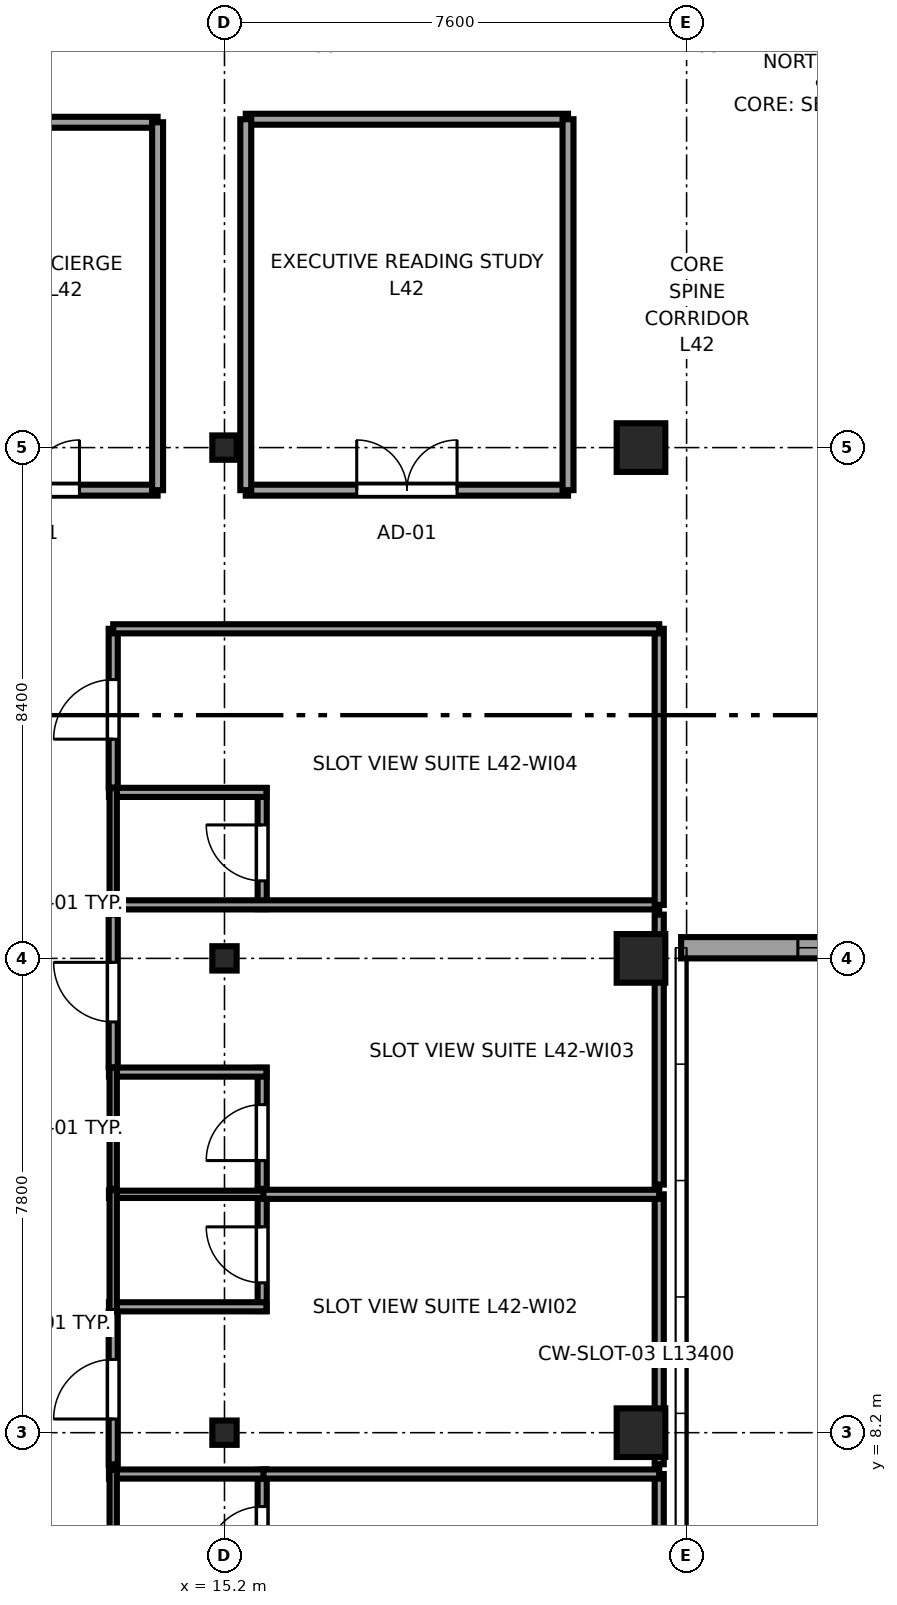
"""IFC4 building model, lengths in metres.
Left out: names, types, materials, properties, quantities, classifications, styles, units other than length and angle.
Written with IfcOpenShell. Run it as: python <this file> out.ifc"""

import sys

from ifc_helpers import new_model, si_unit, direction, frame, frame_2d, origin, origin_2d, place, context, subcontext, project, spatial, rectangle, i_section, extrude, source, transform, mapped, element, fill, save


model = new_model("IFC4")
c1 = context("Model", 3, precision=1e-05, world=origin(), true_north=direction((0.0, 1.0)))
c2 = subcontext(c1, "Body", "Model", "MODEL_VIEW")
j1 = project(units=[si_unit("LENGTHUNIT", "METRE"), si_unit("PLANEANGLEUNIT", "RADIAN")], contexts=[c1])
p1 = place(None, origin())
s1 = spatial("IfcSite", under=j1, at=p1, CompositionType="ELEMENT")
p2 = place(p1, origin())
s2 = spatial("IfcBuilding", under=s1, at=p2, CompositionType="ELEMENT")
p3 = place(p2, frame((0.0, 0.0, 161.25)))
s3 = spatial("IfcBuildingStorey", under=s2, at=p3, CompositionType="ELEMENT", Elevation=161.25)
m1 = source(origin(), c2, "Body", "SweptSolid", [
    extrude(i_section(OverallWidth=0.4, OverallDepth=0.4, WebThickness=0.02, FlangeThickness=0.035, at=origin_2d()), origin(), (0.0, 0.0, 1.0), 3.55),
])
for number, where, z_axis, x_axis in (
    (1, (15.2, 8.2, 0.0), (0.0, 0.0, 1.0), (1.0, 0.0, 0.0)),
    (2, (15.2, 16.0, 0.0), (0.0, 0.0, 1.0), (1.0, 0.0, 0.0)),
    (3, (15.2, 24.4, 0.0), (0.0, 0.0, 1.0), (1.0, 0.0, 0.0)),
):
    element("IfcColumn", number, at=place(p3, frame(where, z_axis=z_axis, x_axis=x_axis)), inside=s3, PredefinedType="COLUMN", context=c2, shape_type="MappedRepresentation", body=[
        mapped(m1, transform((0.0, 0.0, 0.0), x_axis=(1.0, 0.0, 0.0), y_axis=(0.0, 1.0, 0.0), z_axis=(0.0, 0.0, 1.0), scale=1.0)),
    ])
m2 = source(origin(), c2, "Body", "SweptSolid", [
    extrude(rectangle(XDim=0.8, YDim=0.8, at=origin_2d()), origin(), (0.0, 0.0, 1.0), 3.55),
])
for number, where, z_axis, x_axis in (
    (4, (22.05, 8.2, 0.0), (0.0, 0.0, 1.0), (1.0, 0.0, 0.0)),
    (5, (22.05, 16.0, 0.0), (0.0, 0.0, 1.0), (1.0, 0.0, 0.0)),
    (6, (22.05, 24.4, 0.0), (0.0, 0.0, 1.0), (1.0, 0.0, 0.0)),
):
    element("IfcColumn", number, at=place(p3, frame(where, z_axis=z_axis, x_axis=x_axis)), inside=s3, PredefinedType="COLUMN", context=c2, shape_type="MappedRepresentation", body=[
        mapped(m2, transform((0.0, 0.0, 0.0), x_axis=(1.0, 0.0, 0.0), y_axis=(0.0, 1.0, 0.0), z_axis=(0.0, 0.0, 1.0), scale=1.0)),
    ])
p4 = place(p3, frame((22.71, 16.175, 0.0), z_axis=(0.0, 0.0, 1.0), x_axis=(1.0, 0.0, 0.0)))
e7 = element("IfcWall", 7, at=p4, inside=s3, PredefinedType="SOLIDWALL", context=c2, shape_type="SweptSolid", body=[
    extrude(rectangle(XDim=11.58, YDim=0.35, at=frame_2d((5.79, 0.0))), origin(), (0.0, 0.0, 1.0), 2.758),
])
p5 = place(p4, frame((1.92, 0.0, 0.68)))
e8 = element("IfcOpeningElement", 8, at=p5, cuts=e7, PredefinedType="OPENING", context=c2, shape_type="SweptSolid", body=[
    extrude(rectangle(XDim=2.55, YDim=1.92, at=frame_2d((1.275, 0.96))), frame((0.0, 0.185, 0.0), z_axis=(0.0, -1.0, 0.0), x_axis=(1.0, 0.0, 0.0)), (0.0, 0.0, 1.0), 0.37),
])
p6 = place(p4, frame((7.11, 0.0, 0.68)))
e9 = element("IfcOpeningElement", 9, at=p6, cuts=e7, PredefinedType="OPENING", context=c2, shape_type="SweptSolid", body=[
    extrude(rectangle(XDim=2.55, YDim=1.92, at=frame_2d((1.275, 0.96))), frame((0.0, 0.185, 0.0), z_axis=(0.0, -1.0, 0.0), x_axis=(1.0, 0.0, 0.0)), (0.0, 0.0, 1.0), 0.37),
])
p7 = place(p3, frame((15.82, 5.6, 0.0), z_axis=(0.0, 0.0, 1.0), x_axis=(0.0, 1.0, 0.0)))
e10 = element("IfcWall", 10, at=p7, inside=s3, PredefinedType="PARTITIONING", context=c2, shape_type="SweptSolid", body=[
    extrude(rectangle(XDim=1.99, YDim=0.15, at=frame_2d((0.995, 0.0))), origin(), (0.0, 0.0, 1.0), 3.37),
])
p8 = place(p7, frame((0.465, 0.0, 0.0)))
e11 = element("IfcOpeningElement", 11, at=p8, cuts=e10, PredefinedType="OPENING", context=c2, shape_type="SweptSolid", body=[
    extrude(rectangle(XDim=0.92, YDim=2.01, at=frame_2d((0.46, 1.005))), frame((0.0, 0.085, 0.0), z_axis=(0.0, -1.0, 0.0), x_axis=(1.0, 0.0, 0.0)), (0.0, 0.0, 1.0), 0.17),
])
p9 = place(p3, frame((13.3, 7.52, 0.0), z_axis=(0.0, 0.0, 1.0), x_axis=(1.0, 0.0, 0.0)))
e12 = element("IfcWall", 12, at=p9, inside=s3, PredefinedType="PARTITIONING", context=c2, shape_type="SweptSolid", body=[
    extrude(rectangle(XDim=2.59, YDim=0.15, at=frame_2d((1.295, 0.0))), origin(), (0.0, 0.0, 1.0), 3.37),
])
p10 = place(p3, frame((13.37, 5.6, 0.0), z_axis=(0.0, 0.0, 1.0), x_axis=(0.0, 1.0, 0.0)))
e13 = element("IfcWall", 13, at=p10, inside=s3, PredefinedType="PLUMBINGWALL", context=c2, shape_type="SweptSolid", body=[
    extrude(rectangle(XDim=1.99, YDim=0.12, at=frame_2d((0.995, 0.0))), origin(), (0.0, 0.0, 1.0), 3.37),
])
p11 = place(p3, frame((15.82, 10.2, 0.0), z_axis=(0.0, 0.0, 1.0), x_axis=(0.0, 1.0, 0.0)))
e14 = element("IfcWall", 14, at=p11, inside=s3, PredefinedType="PARTITIONING", context=c2, shape_type="SweptSolid", body=[
    extrude(rectangle(XDim=1.99, YDim=0.15, at=frame_2d((0.995, 0.0))), origin(), (0.0, 0.0, 1.0), 3.37),
])
p12 = place(p11, frame((0.465, 0.0, 0.0)))
e15 = element("IfcOpeningElement", 15, at=p12, cuts=e14, PredefinedType="OPENING", context=c2, shape_type="SweptSolid", body=[
    extrude(rectangle(XDim=0.92, YDim=2.01, at=frame_2d((0.46, 1.005))), frame((0.0, 0.085, 0.0), z_axis=(0.0, -1.0, 0.0), x_axis=(1.0, 0.0, 0.0)), (0.0, 0.0, 1.0), 0.17),
])
p13 = place(p3, frame((13.3, 10.27, 0.0), z_axis=(0.0, 0.0, 1.0), x_axis=(1.0, 0.0, 0.0)))
e16 = element("IfcWall", 16, at=p13, inside=s3, PredefinedType="PARTITIONING", context=c2, shape_type="SweptSolid", body=[
    extrude(rectangle(XDim=2.59, YDim=0.15, at=frame_2d((1.295, 0.0))), origin(), (0.0, 0.0, 1.0), 3.37),
])
p14 = place(p3, frame((13.3, 12.12, 0.0), z_axis=(0.0, 0.0, 1.0), x_axis=(1.0, 0.0, 0.0)))
e17 = element("IfcWall", 17, at=p14, inside=s3, PredefinedType="PLUMBINGWALL", context=c2, shape_type="SweptSolid", body=[
    extrude(rectangle(XDim=2.59, YDim=0.12, at=frame_2d((1.295, 0.0))), origin(), (0.0, 0.0, 1.0), 3.37),
])
p15 = place(p3, frame((13.37, 10.2, 0.0), z_axis=(0.0, 0.0, 1.0), x_axis=(0.0, 1.0, 0.0)))
e18 = element("IfcWall", 18, at=p15, inside=s3, PredefinedType="PLUMBINGWALL", context=c2, shape_type="SweptSolid", body=[
    extrude(rectangle(XDim=1.99, YDim=0.12, at=frame_2d((0.995, 0.0))), origin(), (0.0, 0.0, 1.0), 3.37),
])
p16 = place(p3, frame((15.82, 12.21, 0.0), z_axis=(0.0, 0.0, 1.0), x_axis=(0.0, 1.0, 0.0)))
e19 = element("IfcWall", 19, at=p16, inside=s3, PredefinedType="PARTITIONING", context=c2, shape_type="SweptSolid", body=[
    extrude(rectangle(XDim=1.99, YDim=0.15, at=frame_2d((0.995, 0.0))), origin(), (0.0, 0.0, 1.0), 3.37),
])
p17 = place(p16, frame((0.465, 0.0, 0.0)))
e20 = element("IfcOpeningElement", 20, at=p17, cuts=e19, PredefinedType="OPENING", context=c2, shape_type="SweptSolid", body=[
    extrude(rectangle(XDim=0.92, YDim=2.01, at=frame_2d((0.46, 1.005))), frame((0.0, 0.085, 0.0), z_axis=(0.0, -1.0, 0.0), x_axis=(1.0, 0.0, 0.0)), (0.0, 0.0, 1.0), 0.17),
])
p18 = place(p3, frame((13.3, 14.13, 0.0), z_axis=(0.0, 0.0, 1.0), x_axis=(1.0, 0.0, 0.0)))
e21 = element("IfcWall", 21, at=p18, inside=s3, PredefinedType="PARTITIONING", context=c2, shape_type="SweptSolid", body=[
    extrude(rectangle(XDim=2.59, YDim=0.15, at=frame_2d((1.295, 0.0))), origin(), (0.0, 0.0, 1.0), 3.37),
])
p19 = place(p3, frame((13.37, 12.21, 0.0), z_axis=(0.0, 0.0, 1.0), x_axis=(0.0, 1.0, 0.0)))
e22 = element("IfcWall", 22, at=p19, inside=s3, PredefinedType="PLUMBINGWALL", context=c2, shape_type="SweptSolid", body=[
    extrude(rectangle(XDim=1.99, YDim=0.12, at=frame_2d((0.995, 0.0))), origin(), (0.0, 0.0, 1.0), 3.37),
])
p20 = place(p3, frame((15.82, 16.81, 0.0), z_axis=(0.0, 0.0, 1.0), x_axis=(0.0, 1.0, 0.0)))
e23 = element("IfcWall", 23, at=p20, inside=s3, PredefinedType="PARTITIONING", context=c2, shape_type="SweptSolid", body=[
    extrude(rectangle(XDim=1.99, YDim=0.15, at=frame_2d((0.995, 0.0))), origin(), (0.0, 0.0, 1.0), 3.37),
])
p21 = place(p20, frame((0.465, 0.0, 0.0)))
e24 = element("IfcOpeningElement", 24, at=p21, cuts=e23, PredefinedType="OPENING", context=c2, shape_type="SweptSolid", body=[
    extrude(rectangle(XDim=0.92, YDim=2.01, at=frame_2d((0.46, 1.005))), frame((0.0, 0.085, 0.0), z_axis=(0.0, -1.0, 0.0), x_axis=(1.0, 0.0, 0.0)), (0.0, 0.0, 1.0), 0.17),
])
p22 = place(p3, frame((13.3, 16.88, 0.0), z_axis=(0.0, 0.0, 1.0), x_axis=(1.0, 0.0, 0.0)))
e25 = element("IfcWall", 25, at=p22, inside=s3, PredefinedType="PARTITIONING", context=c2, shape_type="SweptSolid", body=[
    extrude(rectangle(XDim=9.05, YDim=0.15, at=frame_2d((4.525, 0.0))), origin(), (0.0, 0.0, 1.0), 3.37),
])
p23 = place(p3, frame((13.3, 18.73, 0.0), z_axis=(0.0, 0.0, 1.0), x_axis=(1.0, 0.0, 0.0)))
e26 = element("IfcWall", 26, at=p23, inside=s3, PredefinedType="PARTITIONING", context=c2, shape_type="SweptSolid", body=[
    extrude(rectangle(XDim=2.59, YDim=0.15, at=frame_2d((1.295, 0.0))), origin(), (0.0, 0.0, 1.0), 3.37),
])
p24 = place(p3, frame((13.37, 16.81, 0.0), z_axis=(0.0, 0.0, 1.0), x_axis=(0.0, 1.0, 0.0)))
e27 = element("IfcWall", 27, at=p24, inside=s3, PredefinedType="PLUMBINGWALL", context=c2, shape_type="SweptSolid", body=[
    extrude(rectangle(XDim=1.99, YDim=0.12, at=frame_2d((0.995, 0.0))), origin(), (0.0, 0.0, 1.0), 3.37),
])
p25 = place(p3, frame((22.35, 3.005, 0.0), z_axis=(0.0, 0.0, 1.0), x_axis=(0.0, 1.0, 0.0)))
e28 = element("IfcWall", 28, at=p25, inside=s3, PredefinedType="PARTITIONING", context=c2, shape_type="SweptSolid", body=[
    extrude(rectangle(XDim=4.515, YDim=0.15, at=frame_2d((2.258, 0.0))), origin(), (0.0, 0.0, 1.0), 3.37),
])
p26 = place(p3, frame((15.84, 7.52, 0.0), z_axis=(0.0, 0.0, 1.0), x_axis=(1.0, 0.0, 0.0)))
e29 = element("IfcWall", 29, at=p26, inside=s3, PredefinedType="PARTITIONING", context=c2, shape_type="SweptSolid", body=[
    extrude(rectangle(XDim=6.51, YDim=0.15, at=frame_2d((3.255, 0.0))), origin(), (0.0, 0.0, 1.0), 3.37),
])
p27 = place(p3, frame((13.37, 7.68, 0.0), z_axis=(0.0, 0.0, 1.0), x_axis=(0.0, 1.0, 0.0)))
e30 = element("IfcWall", 30, at=p27, inside=s3, PredefinedType="PARTITIONING", context=c2, shape_type="SweptSolid", body=[
    extrude(rectangle(XDim=2.51, YDim=0.15, at=frame_2d((1.255, 0.0))), origin(), (0.0, 0.0, 1.0), 3.37),
])
p28 = place(p27, frame((0.745, 0.0, 0.0)))
e31 = element("IfcOpeningElement", 31, at=p28, cuts=e30, PredefinedType="OPENING", context=c2, shape_type="SweptSolid", body=[
    extrude(rectangle(XDim=0.98, YDim=2.12, at=frame_2d((0.49, 1.06))), frame((0.0, 0.085, 0.0), z_axis=(0.0, -1.0, 0.0), x_axis=(1.0, 0.0, 0.0)), (0.0, 0.0, 1.0), 0.17),
])
p29 = place(p3, frame((22.35, 7.68, 0.0), z_axis=(0.0, 0.0, 1.0), x_axis=(0.0, 1.0, 0.0)))
e32 = element("IfcWall", 32, at=p29, inside=s3, PredefinedType="PARTITIONING", context=c2, shape_type="SweptSolid", body=[
    extrude(rectangle(XDim=4.44, YDim=0.15, at=frame_2d((2.22, 0.0))), origin(), (0.0, 0.0, 1.0), 3.37),
])
p30 = place(p3, frame((15.84, 12.12, 0.0), z_axis=(0.0, 0.0, 1.0), x_axis=(1.0, 0.0, 0.0)))
e33 = element("IfcWall", 33, at=p30, inside=s3, PredefinedType="PARTITIONING", context=c2, shape_type="SweptSolid", body=[
    extrude(rectangle(XDim=6.51, YDim=0.15, at=frame_2d((3.255, 0.0))), origin(), (0.0, 0.0, 1.0), 3.37),
])
p31 = place(p3, frame((13.37, 14.21, 0.0), z_axis=(0.0, 0.0, 1.0), x_axis=(0.0, 1.0, 0.0)))
e34 = element("IfcWall", 34, at=p31, inside=s3, PredefinedType="PARTITIONING", context=c2, shape_type="SweptSolid", body=[
    extrude(rectangle(XDim=2.51, YDim=0.15, at=frame_2d((1.255, 0.0))), origin(), (0.0, 0.0, 1.0), 3.37),
])
p32 = place(p31, frame((0.745, 0.0, 0.0)))
e35 = element("IfcOpeningElement", 35, at=p32, cuts=e34, PredefinedType="OPENING", context=c2, shape_type="SweptSolid", body=[
    extrude(rectangle(XDim=0.98, YDim=2.12, at=frame_2d((0.49, 1.06))), frame((0.0, 0.085, 0.0), z_axis=(0.0, -1.0, 0.0), x_axis=(1.0, 0.0, 0.0)), (0.0, 0.0, 1.0), 0.17),
])
p33 = place(p3, frame((22.35, 12.28, 0.0), z_axis=(0.0, 0.0, 1.0), x_axis=(0.0, 1.0, 0.0)))
e36 = element("IfcWall", 36, at=p33, inside=s3, PredefinedType="PARTITIONING", context=c2, shape_type="SweptSolid", body=[
    extrude(rectangle(XDim=4.44, YDim=0.15, at=frame_2d((2.22, 0.0))), origin(), (0.0, 0.0, 1.0), 3.37),
])
p34 = place(p3, frame((13.37, 18.81, 0.0), z_axis=(0.0, 0.0, 1.0), x_axis=(0.0, 1.0, 0.0)))
e37 = element("IfcWall", 37, at=p34, inside=s3, PredefinedType="PARTITIONING", context=c2, shape_type="SweptSolid", body=[
    extrude(rectangle(XDim=2.61, YDim=0.15, at=frame_2d((1.305, 0.0))), origin(), (0.0, 0.0, 1.0), 3.37),
])
p35 = place(p34, frame((0.795, 0.0, 0.0)))
e38 = element("IfcOpeningElement", 38, at=p35, cuts=e37, PredefinedType="OPENING", context=c2, shape_type="SweptSolid", body=[
    extrude(rectangle(XDim=0.98, YDim=2.12, at=frame_2d((0.49, 1.06))), frame((0.0, 0.085, 0.0), z_axis=(0.0, -1.0, 0.0), x_axis=(1.0, 0.0, 0.0)), (0.0, 0.0, 1.0), 0.17),
])
p36 = place(p3, frame((22.35, 16.88, 0.0), z_axis=(0.0, 0.0, 1.0), x_axis=(0.0, 1.0, 0.0)))
e39 = element("IfcWall", 39, at=p36, inside=s3, PredefinedType="PARTITIONING", context=c2, shape_type="SweptSolid", body=[
    extrude(rectangle(XDim=4.54, YDim=0.15, at=frame_2d((2.27, 0.0))), origin(), (0.0, 0.0, 1.0), 3.37),
])
p37 = place(p3, frame((13.37, 21.42, 0.0), z_axis=(0.0, 0.0, 1.0), x_axis=(1.0, 0.0, 0.0)))
e40 = element("IfcWall", 40, at=p37, inside=s3, PredefinedType="PARTITIONING", context=c2, shape_type="SweptSolid", body=[
    extrude(rectangle(XDim=8.98, YDim=0.15, at=frame_2d((4.49, 0.0))), origin(), (0.0, 0.0, 1.0), 3.37),
])
p38 = place(p3, frame((9.88, 23.7, 0.0), z_axis=(0.0, 0.0, 1.0), x_axis=(1.0, 0.0, 0.0)))
e41 = element("IfcWall", 41, at=p38, inside=s3, PredefinedType="PARTITIONING", context=c2, shape_type="SweptSolid", body=[
    extrude(rectangle(XDim=4.22, YDim=0.18, at=frame_2d((2.11, 0.0))), origin(), (0.0, 0.0, 1.0), 3.37),
])
p39 = place(p38, frame((1.285, 0.0, 0.0)))
e42 = element("IfcOpeningElement", 42, at=p39, cuts=e41, PredefinedType="OPENING", context=c2, shape_type="SweptSolid", body=[
    extrude(rectangle(XDim=1.65, YDim=2.15, at=frame_2d((0.825, 1.075))), frame((0.0, 0.1, 0.0), z_axis=(0.0, -1.0, 0.0), x_axis=(1.0, 0.0, 0.0)), (0.0, 0.0, 1.0), 0.2),
])
p40 = place(p3, frame((9.88, 29.75, 0.0), z_axis=(0.0, 0.0, 1.0), x_axis=(1.0, 0.0, 0.0)))
e43 = element("IfcWall", 43, at=p40, inside=s3, PredefinedType="PARTITIONING", context=c2, shape_type="SweptSolid", body=[
    extrude(rectangle(XDim=4.22, YDim=0.18, at=frame_2d((2.11, 0.0))), origin(), (0.0, 0.0, 1.0), 3.37),
])
p41 = place(p3, frame((14.1, 23.7, 0.0), z_axis=(0.0, 0.0, 1.0), x_axis=(0.0, 1.0, 0.0)))
e44 = element("IfcWall", 44, at=p41, inside=s3, PredefinedType="PARTITIONING", context=c2, shape_type="SweptSolid", body=[
    extrude(rectangle(XDim=6.05, YDim=0.18, at=frame_2d((3.025, 0.0))), origin(), (0.0, 0.0, 1.0), 3.37),
])
p42 = place(p3, frame((15.55, 23.7, 0.0), z_axis=(0.0, 0.0, 1.0), x_axis=(1.0, 0.0, 0.0)))
e45 = element("IfcWall", 45, at=p42, inside=s3, PredefinedType="PARTITIONING", context=c2, shape_type="SweptSolid", body=[
    extrude(rectangle(XDim=5.3, YDim=0.18, at=frame_2d((2.65, 0.0))), origin(), (0.0, 0.0, 1.0), 3.37),
])
p43 = place(p42, frame((1.825, 0.0, 0.0)))
e46 = element("IfcOpeningElement", 46, at=p43, cuts=e45, PredefinedType="OPENING", context=c2, shape_type="SweptSolid", body=[
    extrude(rectangle(XDim=1.65, YDim=2.15, at=frame_2d((0.825, 1.075))), frame((0.0, 0.1, 0.0), z_axis=(0.0, -1.0, 0.0), x_axis=(1.0, 0.0, 0.0)), (0.0, 0.0, 1.0), 0.2),
])
p44 = place(p3, frame((15.55, 29.8, 0.0), z_axis=(0.0, 0.0, 1.0), x_axis=(1.0, 0.0, 0.0)))
e47 = element("IfcWall", 47, at=p44, inside=s3, PredefinedType="PARTITIONING", context=c2, shape_type="SweptSolid", body=[
    extrude(rectangle(XDim=5.3, YDim=0.18, at=frame_2d((2.65, 0.0))), origin(), (0.0, 0.0, 1.0), 3.37),
])
for number, where, z_axis, x_axis in (
    (48, (15.55, 23.7, 0.0), (0.0, 0.0, 1.0), (0.0, 1.0, 0.0)),
    (49, (20.85, 23.7, 0.0), (0.0, 0.0, 1.0), (0.0, 1.0, 0.0)),
):
    element("IfcWall", number, at=place(p3, frame(where, z_axis=z_axis, x_axis=x_axis)), inside=s3, PredefinedType="PARTITIONING", context=c2, shape_type="SweptSolid", body=[
        extrude(rectangle(XDim=6.1, YDim=0.18, at=frame_2d((3.05, 0.0))), origin(), (0.0, 0.0, 1.0), 3.37),
    ])
m3 = source(origin(), c2, "Body", "SweptSolid", [
    extrude(rectangle(XDim=2.55, YDim=1.92, at=frame_2d((1.275, 0.96))), frame((0.0, 0.09, 0.0), z_axis=(0.0, -1.0, 0.0), x_axis=(1.0, 0.0, 0.0)), (0.0, 0.0, 1.0), 0.06),
])
p45 = place(p5, origin())
e50 = element("IfcWindow", 50, at=p45, inside=s3, PartitioningType="TRIPLE_PANEL_HORIZONTAL", PredefinedType="WINDOW", context=c2, shape_type="MappedRepresentation", body=[
    mapped(m3, transform((0.0, 0.0, 0.0), x_axis=(1.0, 0.0, 0.0), y_axis=(0.0, 1.0, 0.0), z_axis=(0.0, 0.0, 1.0), scale=1.0)),
])
fill(e8, e50)
m4 = source(origin(), c2, "Body", "SweptSolid", [
    extrude(rectangle(XDim=0.92, YDim=2.01, at=frame_2d((0.46, 1.005))), frame((0.0, 0.025, 0.0), z_axis=(0.0, -1.0, 0.0), x_axis=(1.0, 0.0, 0.0)), (0.0, 0.0, 1.0), 0.05),
])
p46 = place(p8, origin())
e51 = element("IfcDoor", 51, at=p46, inside=s3, OperationType="SINGLE_SWING_LEFT", PredefinedType="DOOR", context=c2, shape_type="MappedRepresentation", body=[
    mapped(m4, transform((0.0, 0.0, 0.0), x_axis=(1.0, 0.0, 0.0), y_axis=(0.0, 1.0, 0.0), z_axis=(0.0, 0.0, 1.0), scale=1.0)),
])
fill(e11, e51)
p47 = place(p12, origin())
e52 = element("IfcDoor", 52, at=p47, inside=s3, OperationType="SINGLE_SWING_RIGHT", PredefinedType="DOOR", context=c2, shape_type="MappedRepresentation", body=[
    mapped(m4, transform((0.0, 0.0, 0.0), x_axis=(1.0, 0.0, 0.0), y_axis=(0.0, 1.0, 0.0), z_axis=(0.0, 0.0, 1.0), scale=1.0)),
])
fill(e15, e52)
p48 = place(p17, origin())
e53 = element("IfcDoor", 53, at=p48, inside=s3, OperationType="SINGLE_SWING_LEFT", PredefinedType="DOOR", context=c2, shape_type="MappedRepresentation", body=[
    mapped(m4, transform((0.0, 0.0, 0.0), x_axis=(1.0, 0.0, 0.0), y_axis=(0.0, 1.0, 0.0), z_axis=(0.0, 0.0, 1.0), scale=1.0)),
])
fill(e20, e53)
p49 = place(p21, origin())
e54 = element("IfcDoor", 54, at=p49, inside=s3, OperationType="SINGLE_SWING_RIGHT", PredefinedType="DOOR", context=c2, shape_type="MappedRepresentation", body=[
    mapped(m4, transform((0.0, 0.0, 0.0), x_axis=(1.0, 0.0, 0.0), y_axis=(0.0, 1.0, 0.0), z_axis=(0.0, 0.0, 1.0), scale=1.0)),
])
fill(e24, e54)
m5 = source(origin(), c2, "Body", "SweptSolid", [
    extrude(rectangle(XDim=0.98, YDim=2.12, at=frame_2d((0.49, 1.06))), frame((0.0, 0.025, 0.0), z_axis=(0.0, -1.0, 0.0), x_axis=(1.0, 0.0, 0.0)), (0.0, 0.0, 1.0), 0.05),
])
p50 = place(p28, origin())
e55 = element("IfcDoor", 55, at=p50, inside=s3, OperationType="SINGLE_SWING_LEFT", PredefinedType="DOOR", context=c2, shape_type="MappedRepresentation", body=[
    mapped(m5, transform((0.0, 0.0, 0.0), x_axis=(1.0, 0.0, 0.0), y_axis=(0.0, 1.0, 0.0), z_axis=(0.0, 0.0, 1.0), scale=1.0)),
])
fill(e31, e55)
p51 = place(p32, origin())
e56 = element("IfcDoor", 56, at=p51, inside=s3, OperationType="SINGLE_SWING_RIGHT", PredefinedType="DOOR", context=c2, shape_type="MappedRepresentation", body=[
    mapped(m5, transform((0.0, 0.0, 0.0), x_axis=(1.0, 0.0, 0.0), y_axis=(0.0, 1.0, 0.0), z_axis=(0.0, 0.0, 1.0), scale=1.0)),
])
fill(e35, e56)
p52 = place(p35, origin())
e57 = element("IfcDoor", 57, at=p52, inside=s3, OperationType="SINGLE_SWING_LEFT", PredefinedType="DOOR", context=c2, shape_type="MappedRepresentation", body=[
    mapped(m5, transform((0.0, 0.0, 0.0), x_axis=(1.0, 0.0, 0.0), y_axis=(0.0, 1.0, 0.0), z_axis=(0.0, 0.0, 1.0), scale=1.0)),
])
fill(e38, e57)
m6 = source(origin(), c2, "Body", "SweptSolid", [
    extrude(rectangle(XDim=1.65, YDim=2.15, at=frame_2d((0.825, 1.075))), frame((0.0, 0.025, 0.0), z_axis=(0.0, -1.0, 0.0), x_axis=(1.0, 0.0, 0.0)), (0.0, 0.0, 1.0), 0.05),
])
p53 = place(p39, origin())
e58 = element("IfcDoor", 58, at=p53, inside=s3, OperationType="DOUBLE_DOOR_SINGLE_SWING", PredefinedType="DOOR", context=c2, shape_type="MappedRepresentation", body=[
    mapped(m6, transform((0.0, 0.0, 0.0), x_axis=(1.0, 0.0, 0.0), y_axis=(0.0, 1.0, 0.0), z_axis=(0.0, 0.0, 1.0), scale=1.0)),
])
fill(e42, e58)
p54 = place(p43, origin())
e59 = element("IfcDoor", 59, at=p54, inside=s3, OperationType="DOUBLE_DOOR_SINGLE_SWING", PredefinedType="DOOR", context=c2, shape_type="MappedRepresentation", body=[
    mapped(m6, transform((0.0, 0.0, 0.0), x_axis=(1.0, 0.0, 0.0), y_axis=(0.0, 1.0, 0.0), z_axis=(0.0, 0.0, 1.0), scale=1.0)),
])
fill(e46, e59)
save(model, sys.argv[1])
